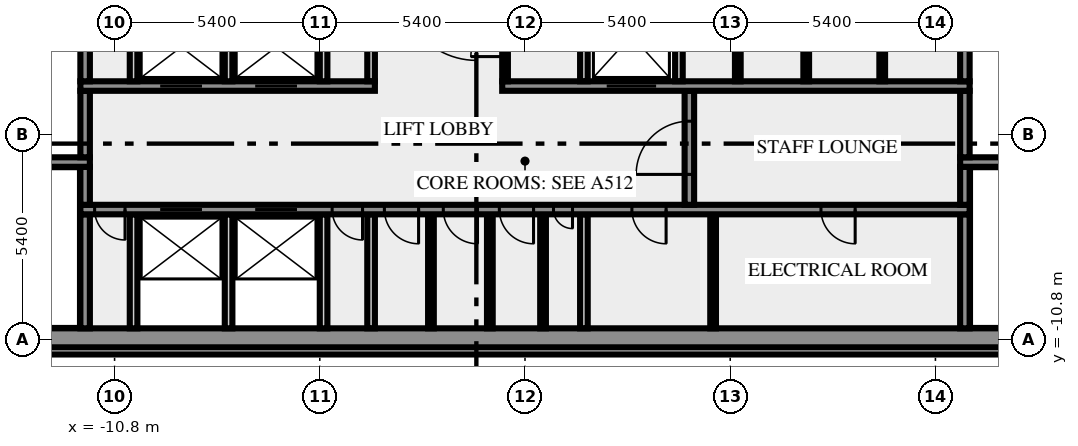
"""IFC4 building model, lengths in metres.
Left out: names, types, materials, properties, quantities, classifications, styles, units other than length and angle.
Written with IfcOpenShell. Run it as: python <this file> out.ifc"""

import sys

from ifc_helpers import new_model, si_unit, direction, frame, frame_2d, origin, place, context, subcontext, project, spatial, rectangle, extrude, element, fill, save


model = new_model("IFC4")
c1 = context("Model", 3, precision=1e-05, world=origin(), true_north=direction((0.0, 1.0)))
c2 = subcontext(c1, "Body", "Model", "MODEL_VIEW")
j1 = project(units=[si_unit("LENGTHUNIT", "METRE"), si_unit("PLANEANGLEUNIT", "RADIAN")], contexts=[c1])
p1 = place(None, origin())
s1 = spatial("IfcSite", under=j1, at=p1, CompositionType="ELEMENT")
p2 = place(p1, origin())
s2 = spatial("IfcBuilding", under=s1, at=p2, CompositionType="ELEMENT")
p3 = place(p2, frame((0.0, 0.0, 285.0)))
s3 = spatial("IfcBuildingStorey", under=s2, at=p3, CompositionType="ELEMENT", Elevation=285.0)
p4 = place(p3, frame((-17.444, -11.088, 0.0), z_axis=(0.0, 0.0, 1.0), x_axis=(1.0, 0.0, 0.0)))
e1 = element("IfcWall", 1, at=p4, inside=s3, PredefinedType="SOLIDWALL", context=c2, shape_type="SweptSolid", body=[
    extrude(rectangle(XDim=34.888, YDim=0.2, at=frame_2d((17.444, 0.0))), origin(), (0.0, 0.0, 1.0), 3.65),
])
p5 = place(p3, frame((-20.0, -10.75, 0.0), z_axis=(0.0, 0.0, 1.0), x_axis=(1.0, 0.0, 0.0)))
e2 = element("IfcWall", 2, at=p5, inside=s3, PredefinedType="SHEAR", context=c2, shape_type="SweptSolid", body=[
    extrude(rectangle(XDim=40.0, YDim=0.5, at=frame_2d((20.0, 0.0))), origin(), (0.0, 0.0, 1.0), 3.65),
])
p6 = place(p5, frame((0.8, 0.0, 1.0)))
e3 = element("IfcOpeningElement", 3, at=p6, cuts=e2, PredefinedType="OPENING", context=c2, shape_type="SweptSolid", body=[
    extrude(rectangle(XDim=1.2, YDim=1.2, at=frame_2d((0.6, 0.6))), frame((0.0, 0.26, 0.0), z_axis=(0.0, -1.0, 0.0), x_axis=(1.0, 0.0, 0.0)), (0.0, 0.0, 1.0), 0.52),
])
p7 = place(p5, frame((38.0, 0.0, 1.0)))
e4 = element("IfcOpeningElement", 4, at=p7, cuts=e2, PredefinedType="OPENING", context=c2, shape_type="SweptSolid", body=[
    extrude(rectangle(XDim=1.2, YDim=1.2, at=frame_2d((0.6, 0.6))), frame((0.0, 0.26, 0.0), z_axis=(0.0, -1.0, 0.0), x_axis=(1.0, 0.0, 0.0)), (0.0, 0.0, 1.0), 0.52),
])
p8 = place(p3, frame((-11.575, -10.5, 0.0), z_axis=(0.0, 0.0, 1.0), x_axis=(0.0, 1.0, 0.0)))
e5 = element("IfcWall", 5, at=p8, inside=s3, PredefinedType="SHEAR", context=c2, shape_type="SweptSolid", body=[
    extrude(rectangle(XDim=3.0, YDim=0.25, at=frame_2d((1.5, 0.0))), origin(), (0.0, 0.0, 1.0), 3.65),
])
for number, where, z_axis, x_axis in (
    (6, (-10.3, -10.5, 0.0), (0.0, 0.0, 1.0), (0.0, 1.0, 0.0)),
    (7, (-7.8, -10.5, 0.0), (0.0, 0.0, 1.0), (0.0, 1.0, 0.0)),
    (8, (-5.3, -10.5, 0.0), (0.0, 0.0, 1.0), (0.0, 1.0, 0.0)),
    (9, (-4.05, -10.5, 0.0), (0.0, 0.0, 1.0), (0.0, 1.0, 0.0)),
):
    element("IfcWall", number, at=place(p3, frame(where, z_axis=z_axis, x_axis=x_axis)), inside=s3, PredefinedType="SOLIDWALL", context=c2, shape_type="SweptSolid", body=[
        extrude(rectangle(XDim=3.0, YDim=0.2, at=frame_2d((1.5, 0.0))), origin(), (0.0, 0.0, 1.0), 3.65),
    ])
for number, where, z_axis, x_axis in (
    (10, (-2.475, -10.5, 0.0), (0.0, 0.0, 1.0), (0.0, 1.0, 0.0)),
    (11, (-0.925, -10.5, 0.0), (0.0, 0.0, 1.0), (0.0, 1.0, 0.0)),
    (12, (0.475, -10.5, 0.0), (0.0, 0.0, 1.0), (0.0, 1.0, 0.0)),
):
    element("IfcWall", number, at=place(p3, frame(where, z_axis=z_axis, x_axis=x_axis)), inside=s3, PredefinedType="PARTITIONING", context=c2, shape_type="SweptSolid", body=[
        extrude(rectangle(XDim=3.0, YDim=0.15, at=frame_2d((1.5, 0.0))), origin(), (0.0, 0.0, 1.0), 3.65),
    ])
p9 = place(p3, frame((1.55, -10.5, 0.0), z_axis=(0.0, 0.0, 1.0), x_axis=(0.0, 1.0, 0.0)))
e13 = element("IfcWall", 13, at=p9, inside=s3, PredefinedType="SOLIDWALL", context=c2, shape_type="SweptSolid", body=[
    extrude(rectangle(XDim=3.0, YDim=0.2, at=frame_2d((1.5, 0.0))), origin(), (0.0, 0.0, 1.0), 3.65),
])
p10 = place(p3, frame((4.95, -10.5, 0.0), z_axis=(0.0, 0.0, 1.0), x_axis=(0.0, 1.0, 0.0)))
e14 = element("IfcWall", 14, at=p10, inside=s3, PredefinedType="PARTITIONING", context=c2, shape_type="SweptSolid", body=[
    extrude(rectangle(XDim=3.0, YDim=0.15, at=frame_2d((1.5, 0.0))), origin(), (0.0, 0.0, 1.0), 3.65),
])
p11 = place(p3, frame((11.575, -10.5, 0.0), z_axis=(0.0, 0.0, 1.0), x_axis=(0.0, 1.0, 0.0)))
e15 = element("IfcWall", 15, at=p11, inside=s3, PredefinedType="SHEAR", context=c2, shape_type="SweptSolid", body=[
    extrude(rectangle(XDim=3.0, YDim=0.25, at=frame_2d((1.5, 0.0))), origin(), (0.0, 0.0, 1.0), 3.65),
])
p12 = place(p3, frame((11.7, -7.375, 0.0), z_axis=(0.0, 0.0, 1.0), x_axis=(-1.0, 0.0, 0.0)))
e16 = element("IfcWall", 16, at=p12, inside=s3, PredefinedType="SHEAR", context=c2, shape_type="SweptSolid", body=[
    extrude(rectangle(XDim=23.4, YDim=0.25, at=frame_2d((11.7, 0.0))), origin(), (0.0, 0.0, 1.0), 3.65),
])
p13 = place(p12, frame((22.225, 0.0, 0.0)))
e17 = element("IfcOpeningElement", 17, at=p13, cuts=e16, PredefinedType="OPENING", context=c2, shape_type="SweptSolid", body=[
    extrude(rectangle(XDim=0.8, YDim=2.1, at=frame_2d((0.4, 1.05))), frame((0.0, 0.135, 0.0), z_axis=(0.0, -1.0, 0.0), x_axis=(1.0, 0.0, 0.0)), (0.0, 0.0, 1.0), 0.27),
])
p14 = place(p12, frame((20.2, 0.0, 0.0)))
e18 = element("IfcOpeningElement", 18, at=p14, cuts=e16, PredefinedType="OPENING", context=c2, shape_type="SweptSolid", body=[
    extrude(rectangle(XDim=1.1, YDim=2.1, at=frame_2d((0.55, 1.05))), frame((0.0, 0.135, 0.0), z_axis=(0.0, -1.0, 0.0), x_axis=(1.0, 0.0, 0.0)), (0.0, 0.0, 1.0), 0.27),
])
p15 = place(p12, frame((17.7, 0.0, 0.0)))
e19 = element("IfcOpeningElement", 19, at=p15, cuts=e16, PredefinedType="OPENING", context=c2, shape_type="SweptSolid", body=[
    extrude(rectangle(XDim=1.1, YDim=2.1, at=frame_2d((0.55, 1.05))), frame((0.0, 0.135, 0.0), z_axis=(0.0, -1.0, 0.0), x_axis=(1.0, 0.0, 0.0)), (0.0, 0.0, 1.0), 0.27),
])
p16 = place(p12, frame((15.975, 0.0, 0.0)))
e20 = element("IfcOpeningElement", 20, at=p16, cuts=e16, PredefinedType="OPENING", context=c2, shape_type="SweptSolid", body=[
    extrude(rectangle(XDim=0.8, YDim=2.1, at=frame_2d((0.4, 1.05))), frame((0.0, 0.135, 0.0), z_axis=(0.0, -1.0, 0.0), x_axis=(1.0, 0.0, 0.0)), (0.0, 0.0, 1.0), 0.27),
])
p17 = place(p12, frame((14.5, 0.0, 0.0)))
e21 = element("IfcOpeningElement", 21, at=p17, cuts=e16, PredefinedType="OPENING", context=c2, shape_type="SweptSolid", body=[
    extrude(rectangle(XDim=0.9, YDim=2.1, at=frame_2d((0.45, 1.05))), frame((0.0, 0.135, 0.0), z_axis=(0.0, -1.0, 0.0), x_axis=(1.0, 0.0, 0.0)), (0.0, 0.0, 1.0), 0.27),
])
p18 = place(p12, frame((12.95, 0.0, 0.0)))
e22 = element("IfcOpeningElement", 22, at=p18, cuts=e16, PredefinedType="OPENING", context=c2, shape_type="SweptSolid", body=[
    extrude(rectangle(XDim=0.9, YDim=2.1, at=frame_2d((0.45, 1.05))), frame((0.0, 0.135, 0.0), z_axis=(0.0, -1.0, 0.0), x_axis=(1.0, 0.0, 0.0)), (0.0, 0.0, 1.0), 0.27),
])
p19 = place(p12, frame((11.475, 0.0, 0.0)))
e23 = element("IfcOpeningElement", 23, at=p19, cuts=e16, PredefinedType="OPENING", context=c2, shape_type="SweptSolid", body=[
    extrude(rectangle(XDim=0.9, YDim=2.1, at=frame_2d((0.45, 1.05))), frame((0.0, 0.135, 0.0), z_axis=(0.0, -1.0, 0.0), x_axis=(1.0, 0.0, 0.0)), (0.0, 0.0, 1.0), 0.27),
])
p20 = place(p12, frame((10.45, 0.0, 0.0)))
e24 = element("IfcOpeningElement", 24, at=p20, cuts=e16, PredefinedType="OPENING", context=c2, shape_type="SweptSolid", body=[
    extrude(rectangle(XDim=0.5, YDim=2.1, at=frame_2d((0.25, 1.05))), frame((0.0, 0.135, 0.0), z_axis=(0.0, -1.0, 0.0), x_axis=(1.0, 0.0, 0.0)), (0.0, 0.0, 1.0), 0.27),
])
p21 = place(p12, frame((7.987, 0.0, 0.0)))
e25 = element("IfcOpeningElement", 25, at=p21, cuts=e16, PredefinedType="OPENING", context=c2, shape_type="SweptSolid", body=[
    extrude(rectangle(XDim=0.9, YDim=2.1, at=frame_2d((0.45, 1.05))), frame((0.0, 0.135, 0.0), z_axis=(0.0, -1.0, 0.0), x_axis=(1.0, 0.0, 0.0)), (0.0, 0.0, 1.0), 0.27),
])
p22 = place(p12, frame((3.012, 0.0, 0.0)))
e26 = element("IfcOpeningElement", 26, at=p22, cuts=e16, PredefinedType="OPENING", context=c2, shape_type="SweptSolid", body=[
    extrude(rectangle(XDim=0.9, YDim=2.1, at=frame_2d((0.45, 1.05))), frame((0.0, 0.135, 0.0), z_axis=(0.0, -1.0, 0.0), x_axis=(1.0, 0.0, 0.0)), (0.0, 0.0, 1.0), 0.27),
])
p23 = place(p3, frame((-11.575, -7.25, 0.0), z_axis=(0.0, 0.0, 1.0), x_axis=(0.0, 1.0, 0.0)))
e27 = element("IfcWall", 27, at=p23, inside=s3, PredefinedType="SHEAR", context=c2, shape_type="SweptSolid", body=[
    extrude(rectangle(XDim=1.0, YDim=0.25, at=frame_2d((0.5, 0.0))), origin(), (0.0, 0.0, 1.0), 3.65),
])
p24 = place(p3, frame((4.325, -7.25, 0.0), z_axis=(0.0, 0.0, 1.0), x_axis=(0.0, 1.0, 0.0)))
e28 = element("IfcWall", 28, at=p24, inside=s3, PredefinedType="SHEAR", context=c2, shape_type="SweptSolid", body=[
    extrude(rectangle(XDim=3.0, YDim=0.25, at=frame_2d((1.5, 0.0))), origin(), (0.0, 0.0, 1.0), 3.65),
])
p25 = place(p24, frame((0.8, 0.0, 0.0)))
e29 = element("IfcOpeningElement", 29, at=p25, cuts=e28, PredefinedType="OPENING", context=c2, shape_type="SweptSolid", body=[
    extrude(rectangle(XDim=1.4, YDim=2.1, at=frame_2d((0.7, 1.05))), frame((0.0, 0.135, 0.0), z_axis=(0.0, -1.0, 0.0), x_axis=(1.0, 0.0, 0.0)), (0.0, 0.0, 1.0), 0.27),
])
p26 = place(p3, frame((11.575, -7.25, 0.0), z_axis=(0.0, 0.0, 1.0), x_axis=(0.0, 1.0, 0.0)))
e30 = element("IfcWall", 30, at=p26, inside=s3, PredefinedType="SHEAR", context=c2, shape_type="SweptSolid", body=[
    extrude(rectangle(XDim=1.0, YDim=0.25, at=frame_2d((0.5, 0.0))), origin(), (0.0, 0.0, 1.0), 3.65),
])
p27 = place(p3, frame((-11.45, -6.125, 0.0), z_axis=(0.0, 0.0, 1.0), x_axis=(-1.0, 0.0, 0.0)))
e31 = element("IfcWall", 31, at=p27, inside=s3, PredefinedType="SHEAR", context=c2, shape_type="SweptSolid", body=[
    extrude(rectangle(XDim=8.05, YDim=0.25, at=frame_2d((4.025, 0.0))), origin(), (0.0, 0.0, 1.0), 3.65),
])
p28 = place(p27, frame((6.2, 0.0, 0.0)))
e32 = element("IfcOpeningElement", 32, at=p28, cuts=e31, PredefinedType="OPENING", context=c2, shape_type="SweptSolid", body=[
    extrude(rectangle(XDim=1.8, YDim=2.1, at=frame_2d((0.9, 1.05))), frame((0.0, 0.135, 0.0), z_axis=(0.0, -1.0, 0.0), x_axis=(1.0, 0.0, 0.0)), (0.0, 0.0, 1.0), 0.27),
])
p29 = place(p3, frame((19.5, -6.125, 0.0), z_axis=(0.0, 0.0, 1.0), x_axis=(-1.0, 0.0, 0.0)))
e33 = element("IfcWall", 33, at=p29, inside=s3, PredefinedType="SHEAR", context=c2, shape_type="SweptSolid", body=[
    extrude(rectangle(XDim=8.05, YDim=0.25, at=frame_2d((4.025, 0.0))), origin(), (0.0, 0.0, 1.0), 3.65),
])
p30 = place(p29, frame((0.05, 0.0, 0.0)))
e34 = element("IfcOpeningElement", 34, at=p30, cuts=e33, PredefinedType="OPENING", context=c2, shape_type="SweptSolid", body=[
    extrude(rectangle(XDim=1.8, YDim=2.1, at=frame_2d((0.9, 1.05))), frame((0.0, 0.135, 0.0), z_axis=(0.0, -1.0, 0.0), x_axis=(1.0, 0.0, 0.0)), (0.0, 0.0, 1.0), 0.27),
])
for number, where, z_axis, x_axis in (
    (35, (-11.575, -6.0, 0.0), (0.0, 0.0, 1.0), (0.0, 1.0, 0.0)),
    (36, (11.575, -6.0, 0.0), (0.0, 0.0, 1.0), (0.0, 1.0, 0.0)),
):
    element("IfcWall", number, at=place(p3, frame(where, z_axis=z_axis, x_axis=x_axis)), inside=s3, PredefinedType="SHEAR", context=c2, shape_type="SweptSolid", body=[
        extrude(rectangle(XDim=1.75, YDim=0.25, at=frame_2d((0.875, 0.0))), origin(), (0.0, 0.0, 1.0), 3.65),
    ])
p31 = place(p3, frame((-11.7, -4.125, 0.0), z_axis=(0.0, 0.0, 1.0), x_axis=(1.0, 0.0, 0.0)))
e37 = element("IfcWall", 37, at=p31, inside=s3, PredefinedType="SHEAR", context=c2, shape_type="SweptSolid", body=[
    extrude(rectangle(XDim=7.75, YDim=0.25, at=frame_2d((3.875, 0.0))), origin(), (0.0, 0.0, 1.0), 3.65),
])
p32 = place(p31, frame((2.1, 0.0, 0.0)))
e38 = element("IfcOpeningElement", 38, at=p32, cuts=e37, PredefinedType="OPENING", context=c2, shape_type="SweptSolid", body=[
    extrude(rectangle(XDim=1.1, YDim=2.1, at=frame_2d((0.55, 1.05))), frame((0.0, 0.135, 0.0), z_axis=(0.0, -1.0, 0.0), x_axis=(1.0, 0.0, 0.0)), (0.0, 0.0, 1.0), 0.27),
])
p33 = place(p31, frame((4.6, 0.0, 0.0)))
e39 = element("IfcOpeningElement", 39, at=p33, cuts=e37, PredefinedType="OPENING", context=c2, shape_type="SweptSolid", body=[
    extrude(rectangle(XDim=1.1, YDim=2.1, at=frame_2d((0.55, 1.05))), frame((0.0, 0.135, 0.0), z_axis=(0.0, -1.0, 0.0), x_axis=(1.0, 0.0, 0.0)), (0.0, 0.0, 1.0), 0.27),
])
p34 = place(p3, frame((-0.6, -4.125, 0.0), z_axis=(0.0, 0.0, 1.0), x_axis=(1.0, 0.0, 0.0)))
e40 = element("IfcWall", 40, at=p34, inside=s3, PredefinedType="SHEAR", context=c2, shape_type="SweptSolid", body=[
    extrude(rectangle(XDim=12.3, YDim=0.25, at=frame_2d((6.15, 0.0))), origin(), (0.0, 0.0, 1.0), 3.65),
])
p35 = place(p34, frame((2.75, 0.0, 0.0)))
e41 = element("IfcOpeningElement", 41, at=p35, cuts=e40, PredefinedType="OPENING", context=c2, shape_type="SweptSolid", body=[
    extrude(rectangle(XDim=1.3, YDim=2.1, at=frame_2d((0.65, 1.05))), frame((0.0, 0.135, 0.0), z_axis=(0.0, -1.0, 0.0), x_axis=(1.0, 0.0, 0.0)), (0.0, 0.0, 1.0), 0.27),
])
p36 = place(p3, frame((-11.575, -4.0, 0.0), z_axis=(0.0, 0.0, 1.0), x_axis=(0.0, 1.0, 0.0)))
e42 = element("IfcWall", 42, at=p36, inside=s3, PredefinedType="SHEAR", context=c2, shape_type="SweptSolid", body=[
    extrude(rectangle(XDim=2.3, YDim=0.25, at=frame_2d((1.15, 0.0))), origin(), (0.0, 0.0, 1.0), 3.65),
])
for number, where, z_axis, x_axis in (
    (43, (-10.3, -4.0, 0.0), (0.0, 0.0, 1.0), (0.0, 1.0, 0.0)),
    (44, (-7.8, -4.0, 0.0), (0.0, 0.0, 1.0), (0.0, 1.0, 0.0)),
    (45, (-5.3, -4.0, 0.0), (0.0, 0.0, 1.0), (0.0, 1.0, 0.0)),
    (46, (-4.05, -4.0, 0.0), (0.0, 0.0, 1.0), (0.0, 1.0, 0.0)),
):
    element("IfcWall", number, at=place(p3, frame(where, z_axis=z_axis, x_axis=x_axis)), inside=s3, PredefinedType="SOLIDWALL", context=c2, shape_type="SweptSolid", body=[
        extrude(rectangle(XDim=2.3, YDim=0.2, at=frame_2d((1.15, 0.0))), origin(), (0.0, 0.0, 1.0), 3.65),
    ])
p37 = place(p3, frame((-0.525, -4.0, 0.0), z_axis=(0.0, 0.0, 1.0), x_axis=(0.0, 1.0, 0.0)))
e47 = element("IfcWall", 47, at=p37, inside=s3, PredefinedType="PARTITIONING", context=c2, shape_type="SweptSolid", body=[
    extrude(rectangle(XDim=2.3, YDim=0.15, at=frame_2d((1.15, 0.0))), origin(), (0.0, 0.0, 1.0), 3.65),
])
p38 = place(p37, frame((0.65, 0.0, 0.0)))
e48 = element("IfcOpeningElement", 48, at=p38, cuts=e47, PredefinedType="OPENING", context=c2, shape_type="SweptSolid", body=[
    extrude(rectangle(XDim=0.9, YDim=2.1, at=frame_2d((0.45, 1.05))), frame((0.0, 0.085, 0.0), z_axis=(0.0, -1.0, 0.0), x_axis=(1.0, 0.0, 0.0)), (0.0, 0.0, 1.0), 0.17),
])
for number, where, z_axis, x_axis in (
    (49, (1.55, -4.0, 0.0), (0.0, 0.0, 1.0), (0.0, 1.0, 0.0)),
    (50, (4.05, -4.0, 0.0), (0.0, 0.0, 1.0), (0.0, 1.0, 0.0)),
):
    element("IfcWall", number, at=place(p3, frame(where, z_axis=z_axis, x_axis=x_axis)), inside=s3, PredefinedType="SOLIDWALL", context=c2, shape_type="SweptSolid", body=[
        extrude(rectangle(XDim=2.3, YDim=0.2, at=frame_2d((1.15, 0.0))), origin(), (0.0, 0.0, 1.0), 3.65),
    ])
for number, where, z_axis, x_axis in (
    (51, (5.6, -4.0, 0.0), (0.0, 0.0, 1.0), (0.0, 1.0, 0.0)),
    (52, (7.4, -4.0, 0.0), (0.0, 0.0, 1.0), (0.0, 1.0, 0.0)),
    (53, (9.4, -4.0, 0.0), (0.0, 0.0, 1.0), (0.0, 1.0, 0.0)),
):
    element("IfcWall", number, at=place(p3, frame(where, z_axis=z_axis, x_axis=x_axis)), inside=s3, PredefinedType="PARTITIONING", context=c2, shape_type="SweptSolid", body=[
        extrude(rectangle(XDim=2.3, YDim=0.15, at=frame_2d((1.15, 0.0))), origin(), (0.0, 0.0, 1.0), 3.65),
    ])
p39 = place(p3, frame((11.575, -4.0, 0.0), z_axis=(0.0, 0.0, 1.0), x_axis=(0.0, 1.0, 0.0)))
e54 = element("IfcWall", 54, at=p39, inside=s3, PredefinedType="SHEAR", context=c2, shape_type="SweptSolid", body=[
    extrude(rectangle(XDim=2.3, YDim=0.25, at=frame_2d((1.15, 0.0))), origin(), (0.0, 0.0, 1.0), 3.65),
])
p40 = place(p13, origin())
e55 = element("IfcDoor", 55, at=p40, inside=s3, OperationType="SINGLE_SWING_RIGHT", PredefinedType="DOOR", context=c2, shape_type="SweptSolid", body=[
    extrude(rectangle(XDim=0.8, YDim=2.1, at=frame_2d((0.4, 1.05))), frame((0.0, 0.025, 0.0), z_axis=(0.0, -1.0, 0.0), x_axis=(1.0, 0.0, 0.0)), (0.0, 0.0, 1.0), 0.05),
])
fill(e17, e55)
p41 = place(p14, origin())
e56 = element("IfcDoor", 56, at=p41, inside=s3, OperationType="DOUBLE_DOOR_SLIDING", PredefinedType="DOOR", context=c2, shape_type="SweptSolid", body=[
    extrude(rectangle(XDim=1.1, YDim=2.1, at=frame_2d((0.55, 1.05))), frame((0.0, 0.025, 0.0), z_axis=(0.0, -1.0, 0.0), x_axis=(1.0, 0.0, 0.0)), (0.0, 0.0, 1.0), 0.05),
])
fill(e18, e56)
p42 = place(p15, origin())
e57 = element("IfcDoor", 57, at=p42, inside=s3, OperationType="DOUBLE_DOOR_SLIDING", PredefinedType="DOOR", context=c2, shape_type="SweptSolid", body=[
    extrude(rectangle(XDim=1.1, YDim=2.1, at=frame_2d((0.55, 1.05))), frame((0.0, 0.025, 0.0), z_axis=(0.0, -1.0, 0.0), x_axis=(1.0, 0.0, 0.0)), (0.0, 0.0, 1.0), 0.05),
])
fill(e19, e57)
p43 = place(p16, origin())
e58 = element("IfcDoor", 58, at=p43, inside=s3, OperationType="SINGLE_SWING_RIGHT", PredefinedType="DOOR", context=c2, shape_type="SweptSolid", body=[
    extrude(rectangle(XDim=0.8, YDim=2.1, at=frame_2d((0.4, 1.05))), frame((0.0, 0.025, 0.0), z_axis=(0.0, -1.0, 0.0), x_axis=(1.0, 0.0, 0.0)), (0.0, 0.0, 1.0), 0.05),
])
fill(e20, e58)
p44 = place(p17, origin())
e59 = element("IfcDoor", 59, at=p44, inside=s3, OperationType="SINGLE_SWING_RIGHT", PredefinedType="DOOR", context=c2, shape_type="SweptSolid", body=[
    extrude(rectangle(XDim=0.9, YDim=2.1, at=frame_2d((0.45, 1.05))), frame((0.0, 0.025, 0.0), z_axis=(0.0, -1.0, 0.0), x_axis=(1.0, 0.0, 0.0)), (0.0, 0.0, 1.0), 0.05),
])
fill(e21, e59)
p45 = place(p18, origin())
e60 = element("IfcDoor", 60, at=p45, inside=s3, OperationType="SINGLE_SWING_RIGHT", PredefinedType="DOOR", context=c2, shape_type="SweptSolid", body=[
    extrude(rectangle(XDim=0.9, YDim=2.1, at=frame_2d((0.45, 1.05))), frame((0.0, 0.025, 0.0), z_axis=(0.0, -1.0, 0.0), x_axis=(1.0, 0.0, 0.0)), (0.0, 0.0, 1.0), 0.05),
])
fill(e22, e60)
p46 = place(p19, origin())
e61 = element("IfcDoor", 61, at=p46, inside=s3, OperationType="SINGLE_SWING_RIGHT", PredefinedType="DOOR", context=c2, shape_type="SweptSolid", body=[
    extrude(rectangle(XDim=0.9, YDim=2.1, at=frame_2d((0.45, 1.05))), frame((0.0, 0.025, 0.0), z_axis=(0.0, -1.0, 0.0), x_axis=(1.0, 0.0, 0.0)), (0.0, 0.0, 1.0), 0.05),
])
fill(e23, e61)
p47 = place(p20, origin())
e62 = element("IfcDoor", 62, at=p47, inside=s3, OperationType="SINGLE_SWING_LEFT", PredefinedType="DOOR", context=c2, shape_type="SweptSolid", body=[
    extrude(rectangle(XDim=0.5, YDim=2.1, at=frame_2d((0.25, 1.05))), frame((0.0, 0.025, 0.0), z_axis=(0.0, -1.0, 0.0), x_axis=(1.0, 0.0, 0.0)), (0.0, 0.0, 1.0), 0.05),
])
fill(e24, e62)
p48 = place(p21, origin())
e63 = element("IfcDoor", 63, at=p48, inside=s3, OperationType="SINGLE_SWING_LEFT", PredefinedType="DOOR", context=c2, shape_type="SweptSolid", body=[
    extrude(rectangle(XDim=0.9, YDim=2.1, at=frame_2d((0.45, 1.05))), frame((0.0, 0.025, 0.0), z_axis=(0.0, -1.0, 0.0), x_axis=(1.0, 0.0, 0.0)), (0.0, 0.0, 1.0), 0.05),
])
fill(e25, e63)
p49 = place(p22, origin())
e64 = element("IfcDoor", 64, at=p49, inside=s3, OperationType="SINGLE_SWING_LEFT", PredefinedType="DOOR", context=c2, shape_type="SweptSolid", body=[
    extrude(rectangle(XDim=0.9, YDim=2.1, at=frame_2d((0.45, 1.05))), frame((0.0, 0.025, 0.0), z_axis=(0.0, -1.0, 0.0), x_axis=(1.0, 0.0, 0.0)), (0.0, 0.0, 1.0), 0.05),
])
fill(e26, e64)
p50 = place(p25, origin())
e65 = element("IfcDoor", 65, at=p50, inside=s3, OperationType="DOUBLE_DOOR_SINGLE_SWING", PredefinedType="DOOR", context=c2, shape_type="SweptSolid", body=[
    extrude(rectangle(XDim=1.4, YDim=2.1, at=frame_2d((0.7, 1.05))), frame((0.0, 0.025, 0.0), z_axis=(0.0, -1.0, 0.0), x_axis=(1.0, 0.0, 0.0)), (0.0, 0.0, 1.0), 0.05),
])
fill(e29, e65)
p51 = place(p32, origin())
e66 = element("IfcDoor", 66, at=p51, inside=s3, OperationType="DOUBLE_DOOR_SLIDING", PredefinedType="DOOR", context=c2, shape_type="SweptSolid", body=[
    extrude(rectangle(XDim=1.1, YDim=2.1, at=frame_2d((0.55, 1.05))), frame((0.0, 0.025, 0.0), z_axis=(0.0, -1.0, 0.0), x_axis=(1.0, 0.0, 0.0)), (0.0, 0.0, 1.0), 0.05),
])
fill(e38, e66)
p52 = place(p33, origin())
e67 = element("IfcDoor", 67, at=p52, inside=s3, OperationType="DOUBLE_DOOR_SLIDING", PredefinedType="DOOR", context=c2, shape_type="SweptSolid", body=[
    extrude(rectangle(XDim=1.1, YDim=2.1, at=frame_2d((0.55, 1.05))), frame((0.0, 0.025, 0.0), z_axis=(0.0, -1.0, 0.0), x_axis=(1.0, 0.0, 0.0)), (0.0, 0.0, 1.0), 0.05),
])
fill(e39, e67)
p53 = place(p35, origin())
e68 = element("IfcDoor", 68, at=p53, inside=s3, OperationType="DOUBLE_DOOR_SLIDING", PredefinedType="DOOR", context=c2, shape_type="SweptSolid", body=[
    extrude(rectangle(XDim=1.3, YDim=2.1, at=frame_2d((0.65, 1.05))), frame((0.0, 0.025, 0.0), z_axis=(0.0, -1.0, 0.0), x_axis=(1.0, 0.0, 0.0)), (0.0, 0.0, 1.0), 0.05),
])
fill(e41, e68)
p54 = place(p38, origin())
e69 = element("IfcDoor", 69, at=p54, inside=s3, OperationType="SINGLE_SWING_LEFT", PredefinedType="DOOR", context=c2, shape_type="SweptSolid", body=[
    extrude(rectangle(XDim=0.9, YDim=2.1, at=frame_2d((0.45, 1.05))), frame((0.0, 0.025, 0.0), z_axis=(0.0, -1.0, 0.0), x_axis=(1.0, 0.0, 0.0)), (0.0, 0.0, 1.0), 0.05),
])
fill(e48, e69)
save(model, sys.argv[1])
